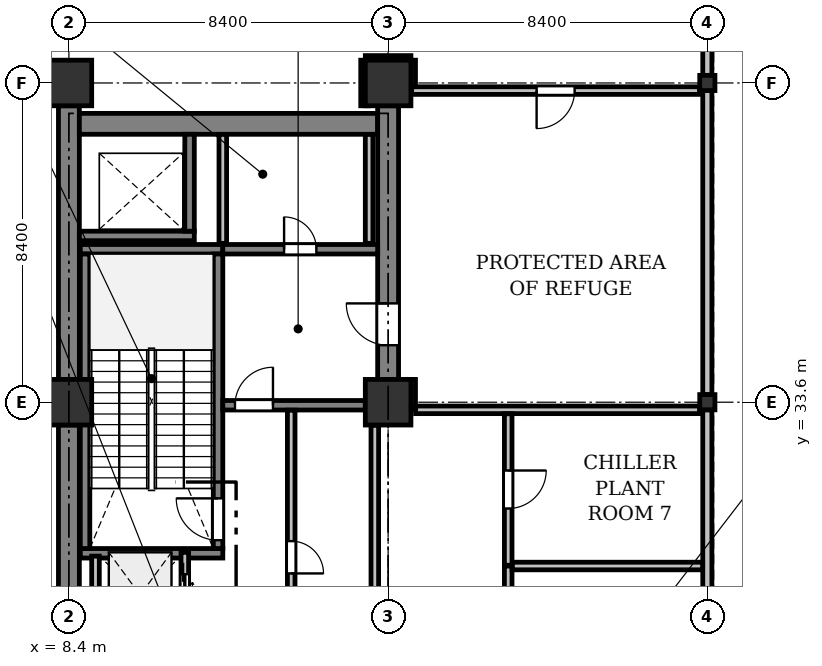
"""IFC4 building model, lengths in metres.
Left out: names, types, materials, properties, quantities, classifications, styles, units other than length and angle.
Written with IfcOpenShell. Run it as: python <this file> out.ifc"""

import sys

from ifc_helpers import new_model, si_unit, direction, frame, frame_2d, origin, origin_2d, place, context, subcontext, project, spatial, rectangle, i_section, extrude, element, fill, save


model = new_model("IFC4")
c1 = context("Model", 3, precision=1e-05, world=origin(), true_north=direction((0.0, 1.0)))
c2 = subcontext(c1, "Body", "Model", "MODEL_VIEW")
j1 = project(units=[si_unit("LENGTHUNIT", "METRE"), si_unit("PLANEANGLEUNIT", "RADIAN")], contexts=[c1])
p1 = place(None, origin())
s1 = spatial("IfcSite", under=j1, at=p1, CompositionType="ELEMENT")
p2 = place(p1, origin())
s2 = spatial("IfcBuilding", under=s1, at=p2, CompositionType="ELEMENT")
p3 = place(p2, frame((0.0, 0.0, 162.3)))
s3 = spatial("IfcBuildingStorey", under=s2, at=p3, CompositionType="ELEMENT", Elevation=162.3)
for number, where, z_axis, x_axis in (
    (1, (8.4, 33.6, 0.0), (0.0, 0.0, 1.0), (1.0, 0.0, 0.0)),
    (2, (8.4, 42.0, 0.0), (0.0, 0.0, 1.0), (1.0, 0.0, 0.0)),
    (3, (16.8, 33.6, 0.0), (0.0, 0.0, 1.0), (1.0, 0.0, 0.0)),
    (4, (16.8, 42.0, 0.0), (0.0, 0.0, 1.0), (1.0, 0.0, 0.0)),
):
    element("IfcColumn", number, at=place(p3, frame(where, z_axis=z_axis, x_axis=x_axis)), inside=s3, PredefinedType="COLUMN", context=c2, shape_type="SweptSolid", body=[
        extrude(rectangle(XDim=1.2, YDim=1.2, at=origin_2d()), origin(), (0.0, 0.0, 1.0), 5.0),
    ])
for number, where, z_axis, x_axis in (
    (5, (25.2, 33.6, 0.0), (0.0, 0.0, 1.0), (1.0, 0.0, 0.0)),
    (6, (25.2, 42.0, 0.0), (0.0, 0.0, 1.0), (1.0, 0.0, 0.0)),
):
    element("IfcColumn", number, at=place(p3, frame(where, z_axis=z_axis, x_axis=x_axis)), inside=s3, PredefinedType="COLUMN", context=c2, shape_type="SweptSolid", body=[
        extrude(i_section(OverallWidth=0.4, OverallDepth=0.4, WebThickness=0.025, FlangeThickness=0.04, at=origin_2d()), origin(), (0.0, 0.0, 1.0), 5.0),
    ])
p4 = place(p3, frame((25.2, 46.08, 0.0), z_axis=(0.0, 0.0, 1.0), x_axis=(0.0, -1.0, 0.0)))
e7 = element("IfcWall", 7, at=p4, inside=s3, PredefinedType="STANDARD", context=c2, shape_type="SweptSolid", body=[
    extrude(rectangle(XDim=3.88, YDim=0.24, at=frame_2d((1.94, 0.0))), origin(), (0.0, 0.0, 1.0), 4.725),
])
for number, where, z_axis, x_axis in (
    (8, (25.2, 41.8, 0.0), (0.0, 0.0, 1.0), (0.0, -1.0, 0.0)),
    (9, (25.2, 33.4, 0.0), (0.0, 0.0, 1.0), (0.0, -1.0, 0.0)),
):
    element("IfcWall", number, at=place(p3, frame(where, z_axis=z_axis, x_axis=x_axis)), inside=s3, PredefinedType="STANDARD", context=c2, shape_type="SweptSolid", body=[
        extrude(rectangle(XDim=8.0, YDim=0.24, at=frame_2d((4.0, 0.0))), origin(), (0.0, 0.0, 1.0), 4.425),
    ])
for number, where, z_axis, x_axis in (
    (10, (8.4, 25.8, 0.0), (0.0, 0.0, 1.0), (0.0, 1.0, 0.0)),
    (11, (8.4, 34.2, 0.0), (0.0, 0.0, 1.0), (0.0, 1.0, 0.0)),
):
    element("IfcWall", number, at=place(p3, frame(where, z_axis=z_axis, x_axis=x_axis)), inside=s3, PredefinedType="SHEAR", context=c2, shape_type="SweptSolid", body=[
        extrude(rectangle(XDim=7.2, YDim=0.55, at=frame_2d((3.6, 0.0))), origin(), (0.0, 0.0, 1.0), 4.725),
    ])
p5 = place(p3, frame((8.675, 40.925, 0.0), z_axis=(0.0, 0.0, 1.0), x_axis=(1.0, 0.0, 0.0)))
e12 = element("IfcWall", 12, at=p5, inside=s3, PredefinedType="SHEAR", context=c2, shape_type="SweptSolid", body=[
    extrude(rectangle(XDim=7.85, YDim=0.55, at=frame_2d((3.925, 0.0))), origin(), (0.0, 0.0, 1.0), 4.725),
])
p6 = place(p3, frame((16.8, 34.2, 0.0), z_axis=(0.0, 0.0, 1.0), x_axis=(0.0, 1.0, 0.0)))
e13 = element("IfcWall", 13, at=p6, inside=s3, PredefinedType="SHEAR", context=c2, shape_type="SweptSolid", body=[
    extrude(rectangle(XDim=7.2, YDim=0.55, at=frame_2d((3.6, 0.0))), origin(), (0.0, 0.0, 1.0), 4.725),
])
p7 = place(p6, frame((0.9, 0.0, 0.0)))
e14 = element("IfcOpeningElement", 14, at=p7, cuts=e13, PredefinedType="OPENING", context=c2, shape_type="SweptSolid", body=[
    extrude(rectangle(XDim=1.1, YDim=2.15, at=frame_2d((0.55, 1.075))), frame((0.0, 0.285, 0.0), z_axis=(0.0, -1.0, 0.0), x_axis=(1.0, 0.0, 0.0)), (0.0, 0.0, 1.0), 0.57),
])
for number, where, z_axis, x_axis in (
    (15, (12.45, 29.625, 0.0), (0.0, 0.0, 1.0), (-1.0, 0.0, 0.0)),
    (16, (12.45, 37.625, 0.0), (0.0, 0.0, 1.0), (-1.0, 0.0, 0.0)),
):
    element("IfcWall", number, at=place(p3, frame(where, z_axis=z_axis, x_axis=x_axis)), inside=s3, PredefinedType="SHEAR", context=c2, shape_type="SweptSolid", body=[
        extrude(rectangle(XDim=3.75, YDim=0.25, at=frame_2d((1.875, 0.0))), origin(), (0.0, 0.0, 1.0), 4.725),
    ])
p8 = place(p3, frame((12.325, 29.75, 0.0), z_axis=(0.0, 0.0, 1.0), x_axis=(0.0, 1.0, 0.0)))
e17 = element("IfcWall", 17, at=p8, inside=s3, PredefinedType="SHEAR", context=c2, shape_type="SweptSolid", body=[
    extrude(rectangle(XDim=7.75, YDim=0.25, at=frame_2d((3.875, 0.0))), origin(), (0.0, 0.0, 1.0), 4.725),
])
p9 = place(p8, frame((0.22, 0.0, 0.0)))
e18 = element("IfcOpeningElement", 18, at=p9, cuts=e17, PredefinedType="OPENING", context=c2, shape_type="SweptSolid", body=[
    extrude(rectangle(XDim=1.1, YDim=2.15, at=frame_2d((0.55, 1.075))), frame((0.0, 0.135, 0.0), z_axis=(0.0, -1.0, 0.0), x_axis=(1.0, 0.0, 0.0)), (0.0, 0.0, 1.0), 0.27),
])
p10 = place(p3, frame((8.825, 29.75, 0.0), z_axis=(0.0, 0.0, 1.0), x_axis=(0.0, 1.0, 0.0)))
e19 = element("IfcWall", 19, at=p10, inside=s3, PredefinedType="SHEAR", context=c2, shape_type="SweptSolid", body=[
    extrude(rectangle(XDim=7.75, YDim=0.25, at=frame_2d((3.875, 0.0))), origin(), (0.0, 0.0, 1.0), 4.725),
])
p11 = place(p3, frame((8.675, 37.975, 0.0), z_axis=(0.0, 0.0, 1.0), x_axis=(1.0, 0.0, 0.0)))
e20 = element("IfcWall", 20, at=p11, inside=s3, PredefinedType="SHEAR", context=c2, shape_type="SweptSolid", body=[
    extrude(rectangle(XDim=3.025, YDim=0.25, at=frame_2d((1.512, 0.0))), origin(), (0.0, 0.0, 1.0), 4.725),
])
p12 = place(p3, frame((11.575, 38.1, 0.0), z_axis=(0.0, 0.0, 1.0), x_axis=(0.0, 1.0, 0.0)))
e21 = element("IfcWall", 21, at=p12, inside=s3, PredefinedType="SHEAR", context=c2, shape_type="SweptSolid", body=[
    extrude(rectangle(XDim=2.55, YDim=0.25, at=frame_2d((1.275, 0.0))), origin(), (0.0, 0.0, 1.0), 4.725),
])
p13 = place(p3, frame((12.45, 33.52, 0.0), z_axis=(0.0, 0.0, 1.0), x_axis=(1.0, 0.0, 0.0)))
e22 = element("IfcWall", 22, at=p13, inside=s3, PredefinedType="SHEAR", context=c2, shape_type="SweptSolid", body=[
    extrude(rectangle(XDim=3.75, YDim=0.25, at=frame_2d((1.875, 0.0))), origin(), (0.0, 0.0, 1.0), 4.725),
])
p14 = place(p13, frame((0.32, 0.0, 0.0)))
e23 = element("IfcOpeningElement", 23, at=p14, cuts=e22, PredefinedType="OPENING", context=c2, shape_type="SweptSolid", body=[
    extrude(rectangle(XDim=1.0, YDim=2.15, at=frame_2d((0.5, 1.075))), frame((0.0, 0.135, 0.0), z_axis=(0.0, -1.0, 0.0), x_axis=(1.0, 0.0, 0.0)), (0.0, 0.0, 1.0), 0.27),
])
p15 = place(p3, frame((12.45, 37.625, 0.0), z_axis=(0.0, 0.0, 1.0), x_axis=(1.0, 0.0, 0.0)))
e24 = element("IfcWall", 24, at=p15, inside=s3, PredefinedType="SHEAR", context=c2, shape_type="SweptSolid", body=[
    extrude(rectangle(XDim=4.075, YDim=0.25, at=frame_2d((2.038, 0.0))), origin(), (0.0, 0.0, 1.0), 4.725),
])
p16 = place(p15, frame((1.613, 0.0, 0.0)))
e25 = element("IfcOpeningElement", 25, at=p16, cuts=e24, PredefinedType="OPENING", context=c2, shape_type="SweptSolid", body=[
    extrude(rectangle(XDim=0.85, YDim=2.15, at=frame_2d((0.425, 1.075))), frame((0.0, 0.135, 0.0), z_axis=(0.0, -1.0, 0.0), x_axis=(1.0, 0.0, 0.0)), (0.0, 0.0, 1.0), 0.27),
])
p17 = place(p3, frame((11.45, 27.4, 0.0), z_axis=(0.0, 0.0, 1.0), x_axis=(0.0, 1.0, 0.0)))
e26 = element("IfcWall", 26, at=p17, inside=s3, PredefinedType="PARTITIONING", context=c2, shape_type="SweptSolid", body=[
    extrude(rectangle(XDim=2.25, YDim=0.2, at=frame_2d((1.125, 0.0))), origin(), (0.0, 0.0, 1.0), 4.725),
])
p18 = place(p17, frame((0.575, 0.0, 0.0)))
e27 = element("IfcOpeningElement", 27, at=p18, cuts=e26, PredefinedType="OPENING", context=c2, shape_type="SweptSolid", body=[
    extrude(rectangle(XDim=1.1, YDim=2.2, at=frame_2d((0.55, 1.1))), frame((0.0, 0.11, 0.0), z_axis=(0.0, -1.0, 0.0), x_axis=(1.0, 0.0, 0.0)), (0.0, 0.0, 1.0), 0.22),
])
p19 = place(p3, frame((9.1, 27.5, 0.0), z_axis=(0.0, 0.0, 1.0), x_axis=(0.0, 1.0, 0.0)))
e28 = element("IfcWall", 28, at=p19, inside=s3, PredefinedType="PARTITIONING", context=c2, shape_type="SweptSolid", body=[
    extrude(rectangle(XDim=2.05, YDim=0.2, at=frame_2d((1.025, 0.0))), origin(), (0.0, 0.0, 1.0), 4.725),
])
p20 = place(p3, frame((16.45, 25.805, 0.0), z_axis=(0.0, 0.0, 1.0), x_axis=(0.0, 1.0, 0.0)))
e29 = element("IfcWall", 29, at=p20, inside=s3, PredefinedType="PARTITIONING", context=c2, shape_type="SweptSolid", body=[
    extrude(rectangle(XDim=7.19, YDim=0.2, at=frame_2d((3.595, 0.0))), origin(), (0.0, 0.0, 1.0), 4.725),
])
p21 = place(p3, frame((14.25, 33.39, 0.0), z_axis=(0.0, 0.0, 1.0), x_axis=(0.0, -1.0, 0.0)))
e30 = element("IfcWall", 30, at=p21, inside=s3, PredefinedType="PARTITIONING", context=c2, shape_type="SweptSolid", body=[
    extrude(rectangle(XDim=7.74, YDim=0.2, at=frame_2d((3.87, 0.0))), origin(), (0.0, 0.0, 1.0), 4.725),
])
p22 = place(p21, frame((3.445, 0.0, 0.0)))
e31 = element("IfcOpeningElement", 31, at=p22, cuts=e30, PredefinedType="OPENING", context=c2, shape_type="SweptSolid", body=[
    extrude(rectangle(XDim=0.85, YDim=2.15, at=frame_2d((0.425, 1.075))), frame((0.0, 0.11, 0.0), z_axis=(0.0, -1.0, 0.0), x_axis=(1.0, 0.0, 0.0)), (0.0, 0.0, 1.0), 0.22),
])
for number, where, z_axis, x_axis in (
    (32, (16.3, 37.78, 0.0), (0.0, 0.0, 1.0), (0.0, 1.0, 0.0)),
    (33, (12.45, 40.646, 0.0), (0.0, 0.0, 1.0), (0.0, -1.0, 0.0)),
):
    element("IfcWall", number, at=place(p3, frame(where, z_axis=z_axis, x_axis=x_axis)), inside=s3, PredefinedType="PARTITIONING", context=c2, shape_type="SweptSolid", body=[
        extrude(rectangle(XDim=2.866, YDim=0.2, at=frame_2d((1.433, 0.0))), origin(), (0.0, 0.0, 1.0), 3.625),
    ])
p23 = place(p3, frame((17.42, 34.2, 0.0), z_axis=(0.0, 0.0, 1.0), x_axis=(0.0, -1.0, 0.0)))
e34 = element("IfcWall", 34, at=p23, inside=s3, PredefinedType="PARTITIONING", context=c2, shape_type="SweptSolid", body=[
    extrude(rectangle(XDim=0.8, YDim=0.2, at=frame_2d((0.4, 0.0))), origin(), (0.0, 0.0, 1.0), 3.825),
])
p24 = place(p3, frame((17.524, 33.4, 0.0), z_axis=(0.0, 0.0, 1.0), x_axis=(1.0, 0.0, 0.0)))
e35 = element("IfcWall", 35, at=p24, inside=s3, PredefinedType="PARTITIONING", context=c2, shape_type="SweptSolid", body=[
    extrude(rectangle(XDim=7.471, YDim=0.2, at=frame_2d((3.736, 0.0))), origin(), (0.0, 0.0, 1.0), 3.825),
])
p25 = place(p3, frame((24.995, 41.8, 0.0), z_axis=(0.0, 0.0, 1.0), x_axis=(-1.0, 0.0, 0.0)))
e36 = element("IfcWall", 36, at=p25, inside=s3, PredefinedType="PARTITIONING", context=c2, shape_type="SweptSolid", body=[
    extrude(rectangle(XDim=7.575, YDim=0.2, at=frame_2d((3.788, 0.0))), origin(), (0.0, 0.0, 1.0), 3.825),
])
p26 = place(p25, frame((3.288, 0.0, 0.0)))
e37 = element("IfcOpeningElement", 37, at=p26, cuts=e36, PredefinedType="OPENING", context=c2, shape_type="SweptSolid", body=[
    extrude(rectangle(XDim=1.0, YDim=2.15, at=frame_2d((0.5, 1.075))), frame((0.0, 0.11, 0.0), z_axis=(0.0, -1.0, 0.0), x_axis=(1.0, 0.0, 0.0)), (0.0, 0.0, 1.0), 0.22),
])
p27 = place(p3, frame((16.18, 41.4, 0.0), z_axis=(0.0, 0.0, 1.0), x_axis=(0.0, 1.0, 0.0)))
e38 = element("IfcWall", 38, at=p27, inside=s3, PredefinedType="PARTITIONING", context=c2, shape_type="SweptSolid", body=[
    extrude(rectangle(XDim=1.2, YDim=0.2, at=frame_2d((0.6, 0.0))), origin(), (0.0, 0.0, 1.0), 3.825),
])
p28 = place(p3, frame((16.2, 42.62, 0.0), z_axis=(0.0, 0.0, 1.0), x_axis=(1.0, 0.0, 0.0)))
e39 = element("IfcWall", 39, at=p28, inside=s3, PredefinedType="PARTITIONING", context=c2, shape_type="SweptSolid", body=[
    extrude(rectangle(XDim=1.2, YDim=0.2, at=frame_2d((0.6, 0.0))), origin(), (0.0, 0.0, 1.0), 3.709),
])
p29 = place(p3, frame((17.42, 42.6, 0.0), z_axis=(0.0, 0.0, 1.0), x_axis=(0.0, -1.0, 0.0)))
e40 = element("IfcWall", 40, at=p29, inside=s3, PredefinedType="PARTITIONING", context=c2, shape_type="SweptSolid", body=[
    extrude(rectangle(XDim=0.696, YDim=0.2, at=frame_2d((0.348, 0.0))), origin(), (0.0, 0.0, 1.0), 3.825),
])
p30 = place(p3, frame((19.96, 29.29, 0.0), z_axis=(0.0, 0.0, 1.0), x_axis=(0.0, -1.0, 0.0)))
e41 = element("IfcWall", 41, at=p30, inside=s3, PredefinedType="PARTITIONING", context=c2, shape_type="SweptSolid", body=[
    extrude(rectangle(XDim=4.03, YDim=0.2, at=frame_2d((2.015, 0.0))), origin(), (0.0, 0.0, 1.0), 3.825),
])
p31 = place(p3, frame((25.076, 29.29, 0.0), z_axis=(0.0, 0.0, 1.0), x_axis=(-1.0, 0.0, 0.0)))
e42 = element("IfcWall", 42, at=p31, inside=s3, PredefinedType="PARTITIONING", context=c2, shape_type="SweptSolid", body=[
    extrude(rectangle(XDim=5.012, YDim=0.2, at=frame_2d((2.506, 0.0))), origin(), (0.0, 0.0, 1.0), 4.322),
])
p32 = place(p3, frame((19.96, 33.296, 0.0), z_axis=(0.0, 0.0, 1.0), x_axis=(0.0, -1.0, 0.0)))
e43 = element("IfcWall", 43, at=p32, inside=s3, PredefinedType="PARTITIONING", context=c2, shape_type="SweptSolid", body=[
    extrude(rectangle(XDim=3.986, YDim=0.2, at=frame_2d((1.993, 0.0))), origin(), (0.0, 0.0, 1.0), 4.725),
])
p33 = place(p32, frame((1.493, 0.0, 0.0)))
e44 = element("IfcOpeningElement", 44, at=p33, cuts=e43, PredefinedType="OPENING", context=c2, shape_type="SweptSolid", body=[
    extrude(rectangle(XDim=1.0, YDim=2.15, at=frame_2d((0.5, 1.075))), frame((0.0, 0.11, 0.0), z_axis=(0.0, -1.0, 0.0), x_axis=(1.0, 0.0, 0.0)), (0.0, 0.0, 1.0), 0.22),
])
p34 = place(p7, origin())
e45 = element("IfcDoor", 45, at=p34, inside=s3, OperationType="SINGLE_SWING_RIGHT", PredefinedType="DOOR", context=c2, shape_type="SweptSolid", body=[
    extrude(rectangle(XDim=1.1, YDim=2.15, at=frame_2d((0.55, 1.075))), frame((0.0, 0.025, 0.0), z_axis=(0.0, -1.0, 0.0), x_axis=(1.0, 0.0, 0.0)), (0.0, 0.0, 1.0), 0.05),
])
fill(e14, e45)
p35 = place(p9, origin())
e46 = element("IfcDoor", 46, at=p35, inside=s3, OperationType="SINGLE_SWING_RIGHT", PredefinedType="DOOR", context=c2, shape_type="SweptSolid", body=[
    extrude(rectangle(XDim=1.1, YDim=2.15, at=frame_2d((0.55, 1.075))), frame((0.0, 0.025, 0.0), z_axis=(0.0, -1.0, 0.0), x_axis=(1.0, 0.0, 0.0)), (0.0, 0.0, 1.0), 0.05),
])
fill(e18, e46)
p36 = place(p14, origin())
e47 = element("IfcDoor", 47, at=p36, inside=s3, OperationType="SINGLE_SWING_RIGHT", PredefinedType="DOOR", context=c2, shape_type="SweptSolid", body=[
    extrude(rectangle(XDim=1.0, YDim=2.15, at=frame_2d((0.5, 1.075))), frame((0.0, 0.025, 0.0), z_axis=(0.0, -1.0, 0.0), x_axis=(1.0, 0.0, 0.0)), (0.0, 0.0, 1.0), 0.05),
])
fill(e23, e47)
p37 = place(p18, origin())
e48 = element("IfcDoor", 48, at=p37, inside=s3, OperationType="DOUBLE_DOOR_SLIDING", PredefinedType="DOOR", context=c2, shape_type="SweptSolid", body=[
    extrude(rectangle(XDim=1.1, YDim=2.2, at=frame_2d((0.55, 1.1))), frame((0.0, 0.025, 0.0), z_axis=(0.0, -1.0, 0.0), x_axis=(1.0, 0.0, 0.0)), (0.0, 0.0, 1.0), 0.05),
])
fill(e27, e48)
p38 = place(p22, origin())
e49 = element("IfcDoor", 49, at=p38, inside=s3, OperationType="SINGLE_SWING_RIGHT", PredefinedType="DOOR", context=c2, shape_type="SweptSolid", body=[
    extrude(rectangle(XDim=0.85, YDim=2.15, at=frame_2d((0.425, 1.075))), frame((0.0, 0.025, 0.0), z_axis=(0.0, -1.0, 0.0), x_axis=(1.0, 0.0, 0.0)), (0.0, 0.0, 1.0), 0.05),
])
fill(e31, e49)
p39 = place(p16, origin())
e50 = element("IfcDoor", 50, at=p39, inside=s3, OperationType="SINGLE_SWING_LEFT", PredefinedType="DOOR", context=c2, shape_type="SweptSolid", body=[
    extrude(rectangle(XDim=0.85, YDim=2.15, at=frame_2d((0.425, 1.075))), frame((0.0, 0.025, 0.0), z_axis=(0.0, -1.0, 0.0), x_axis=(1.0, 0.0, 0.0)), (0.0, 0.0, 1.0), 0.05),
])
fill(e25, e50)
p40 = place(p26, origin())
e51 = element("IfcDoor", 51, at=p40, inside=s3, OperationType="SINGLE_SWING_RIGHT", PredefinedType="DOOR", context=c2, shape_type="SweptSolid", body=[
    extrude(rectangle(XDim=1.0, YDim=2.15, at=frame_2d((0.5, 1.075))), frame((0.0, 0.025, 0.0), z_axis=(0.0, -1.0, 0.0), x_axis=(1.0, 0.0, 0.0)), (0.0, 0.0, 1.0), 0.05),
])
fill(e37, e51)
p41 = place(p33, origin())
e52 = element("IfcDoor", 52, at=p41, inside=s3, OperationType="SINGLE_SWING_LEFT", PredefinedType="DOOR", context=c2, shape_type="SweptSolid", body=[
    extrude(rectangle(XDim=1.0, YDim=2.15, at=frame_2d((0.5, 1.075))), frame((0.0, 0.025, 0.0), z_axis=(0.0, -1.0, 0.0), x_axis=(1.0, 0.0, 0.0)), (0.0, 0.0, 1.0), 0.05),
])
fill(e44, e52)
save(model, sys.argv[1])
